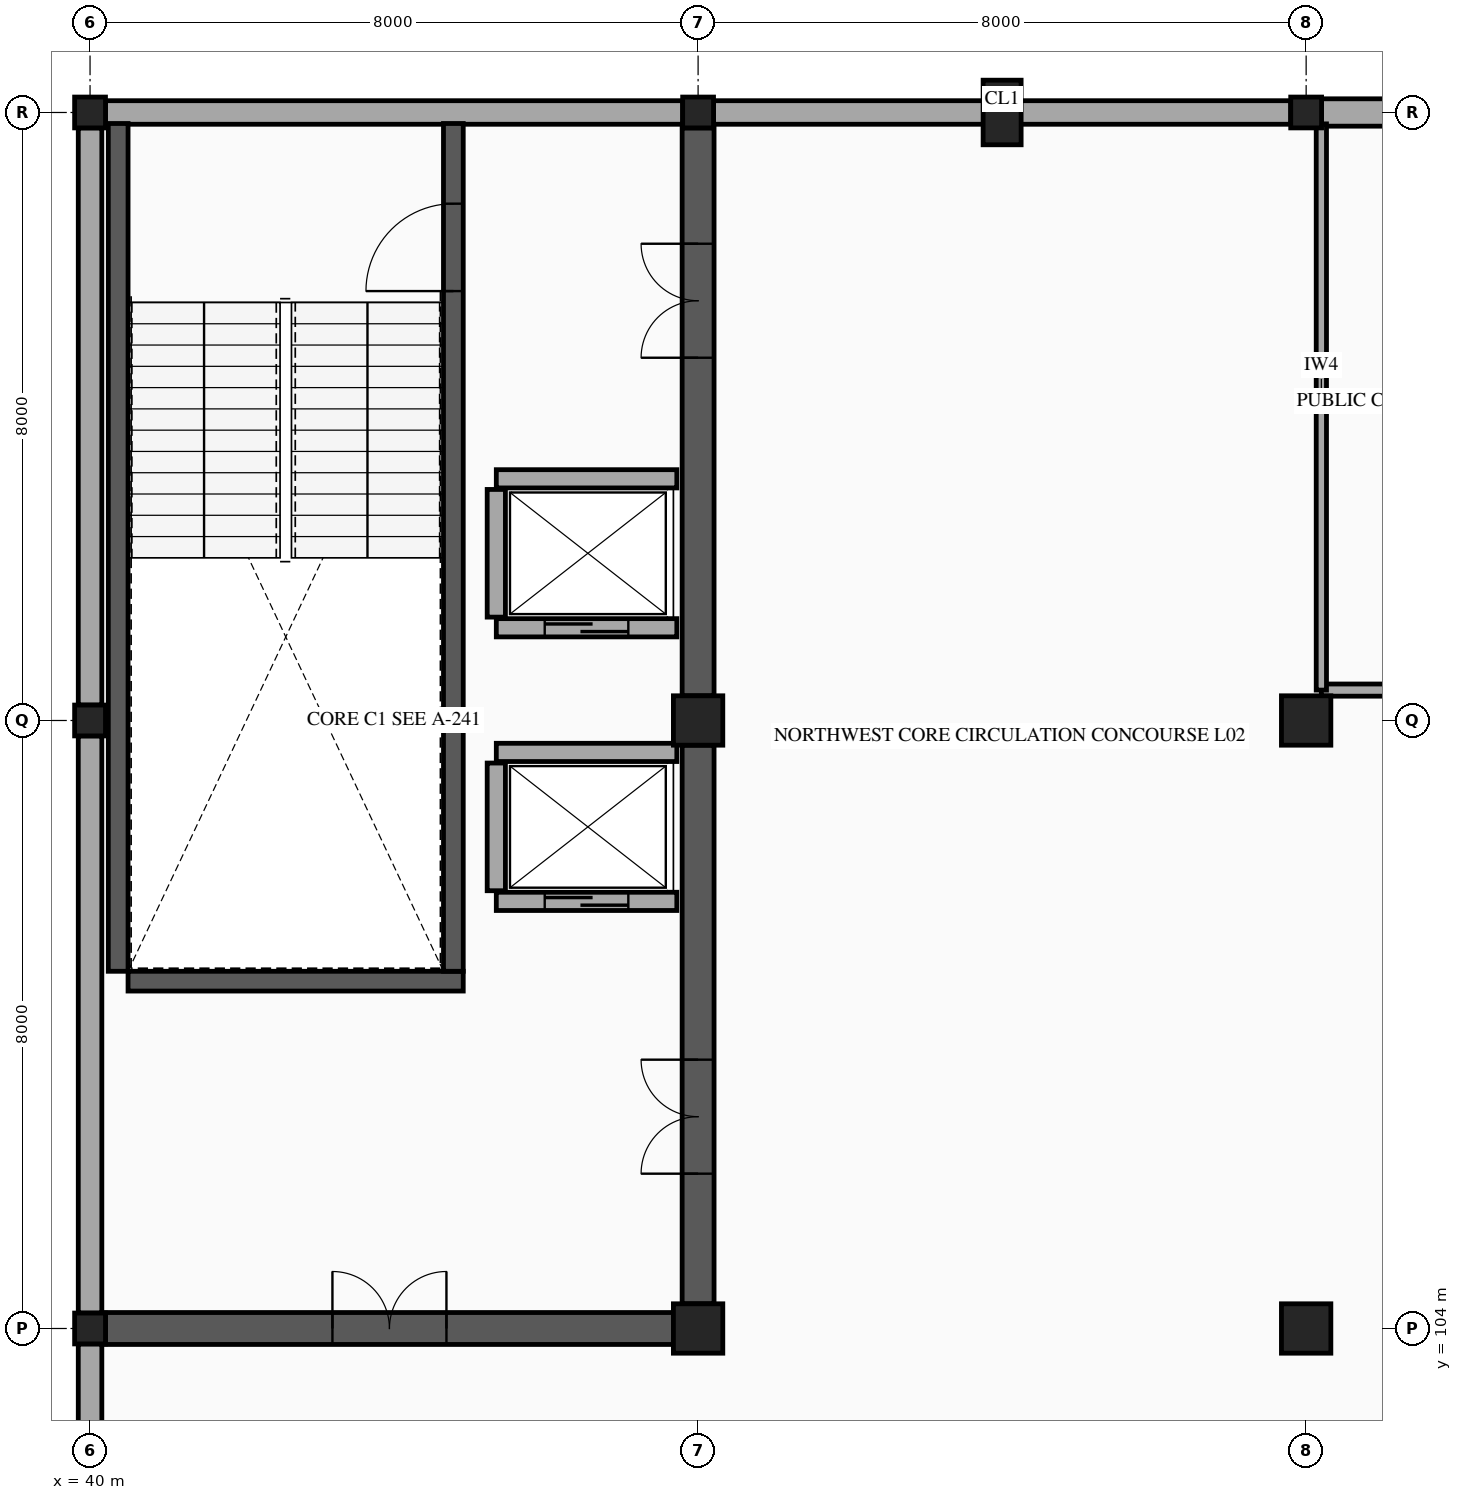
"""IFC4 building model, lengths in metres.
Left out: names, types, materials, properties, quantities, classifications, styles, units other than length and angle.
Written with IfcOpenShell. Run it as: python <this file> out.ifc"""

import sys

from ifc_helpers import new_model, si_unit, direction, frame, frame_2d, origin, origin_2d, place, context, subcontext, project, spatial, rectangle, hollow_rectangle, extrude, element, fill, save


model = new_model("IFC4")
c1 = context("Model", 3, precision=1e-05, world=origin(), true_north=direction((0.0, 1.0)))
c2 = subcontext(c1, "Body", "Model", "MODEL_VIEW")
j1 = project(units=[si_unit("LENGTHUNIT", "METRE"), si_unit("PLANEANGLEUNIT", "RADIAN")], contexts=[c1])
p1 = place(None, origin())
s1 = spatial("IfcSite", under=j1, at=p1, CompositionType="ELEMENT")
p2 = place(p1, origin())
s2 = spatial("IfcBuilding", under=s1, at=p2, CompositionType="ELEMENT")
p3 = place(p2, frame((0.0, 0.0, 10.4)))
s3 = spatial("IfcBuildingStorey", under=s2, at=p3, CompositionType="ELEMENT", Elevation=10.4)
for number, where, z_axis, x_axis in (
    (1, (40.0, 104.0, 0.0), (0.0, 0.0, 1.0), (1.0, 0.0, 0.0)),
    (2, (40.0, 112.0, 0.0), (0.0, 0.0, 1.0), (1.0, 0.0, 0.0)),
    (3, (40.0, 120.0, 0.0), (0.0, 0.0, 1.0), (1.0, 0.0, 0.0)),
):
    element("IfcColumn", number, at=place(p3, frame(where, z_axis=z_axis, x_axis=x_axis)), inside=s3, PredefinedType="COLUMN", context=c2, shape_type="SweptSolid", body=[
        extrude(hollow_rectangle(XDim=0.406, YDim=0.406, WallThickness=0.015, InnerFilletRadius=0.015, OuterFilletRadius=0.029, at=origin_2d()), origin(), (0.0, 0.0, 1.0), 4.5),
    ])
for number, where, z_axis, x_axis in (
    (4, (48.0, 104.0, 0.0), (0.0, 0.0, 1.0), (1.0, 0.0, 0.0)),
    (5, (48.0, 112.0, 0.0), (0.0, 0.0, 1.0), (1.0, 0.0, 0.0)),
):
    element("IfcColumn", number, at=place(p3, frame(where, z_axis=z_axis, x_axis=x_axis)), inside=s3, PredefinedType="COLUMN", context=c2, shape_type="SweptSolid", body=[
        extrude(rectangle(XDim=0.65, YDim=0.65, at=origin_2d()), origin(), (0.0, 0.0, 1.0), 4.5),
    ])
p4 = place(p3, frame((48.0, 120.0, 0.0), z_axis=(0.0, 0.0, 1.0), x_axis=(1.0, 0.0, 0.0)))
e6 = element("IfcColumn", 6, at=p4, inside=s3, PredefinedType="COLUMN", context=c2, shape_type="SweptSolid", body=[
    extrude(hollow_rectangle(XDim=0.406, YDim=0.406, WallThickness=0.015, InnerFilletRadius=0.015, OuterFilletRadius=0.029, at=origin_2d()), origin(), (0.0, 0.0, 1.0), 4.5),
])
for number, where, z_axis, x_axis in (
    (7, (56.0, 104.0, 0.0), (0.0, 0.0, 1.0), (1.0, 0.0, 0.0)),
    (8, (56.0, 112.0, 0.0), (0.0, 0.0, 1.0), (1.0, 0.0, 0.0)),
):
    element("IfcColumn", number, at=place(p3, frame(where, z_axis=z_axis, x_axis=x_axis)), inside=s3, PredefinedType="COLUMN", context=c2, shape_type="SweptSolid", body=[
        extrude(rectangle(XDim=0.65, YDim=0.65, at=origin_2d()), origin(), (0.0, 0.0, 1.0), 4.5),
    ])
p5 = place(p3, frame((56.0, 120.0, 0.0), z_axis=(0.0, 0.0, 1.0), x_axis=(1.0, 0.0, 0.0)))
e9 = element("IfcColumn", 9, at=p5, inside=s3, PredefinedType="COLUMN", context=c2, shape_type="SweptSolid", body=[
    extrude(hollow_rectangle(XDim=0.406, YDim=0.406, WallThickness=0.015, InnerFilletRadius=0.015, OuterFilletRadius=0.029, at=origin_2d()), origin(), (0.0, 0.0, 1.0), 4.5),
])
p6 = place(p3, frame((52.0, 120.0, 0.0), z_axis=(0.0, 0.0, 1.0), x_axis=(1.0, 0.0, 0.0)))
e10 = element("IfcColumn", 10, at=p6, inside=s3, PredefinedType="PILASTER", context=c2, shape_type="SweptSolid", body=[
    extrude(rectangle(XDim=0.5, YDim=0.85, at=origin_2d()), origin(), (0.0, 0.0, 1.0), 4.5),
])
p7 = place(p3, frame((40.0, 96.203, 0.0), z_axis=(0.0, 0.0, 1.0), x_axis=(0.0, 1.0, 0.0)))
e11 = element("IfcWall", 11, at=p7, inside=s3, PredefinedType="STANDARD", context=c2, shape_type="SweptSolid", body=[
    extrude(rectangle(XDim=7.594, YDim=0.31, at=frame_2d((3.797, 0.0))), origin(), (0.0, 0.0, 1.0), 3.48),
])
p8 = place(p7, frame((2.622, 0.0, 0.8)))
e12 = element("IfcOpeningElement", 12, at=p8, cuts=e11, PredefinedType="OPENING", context=c2, shape_type="SweptSolid", body=[
    extrude(rectangle(XDim=2.35, YDim=2.15, at=frame_2d((1.175, 1.075))), frame((0.0, 0.165, 0.0), z_axis=(0.0, -1.0, 0.0), x_axis=(1.0, 0.0, 0.0)), (0.0, 0.0, 1.0), 0.33),
])
for number, where, z_axis, x_axis in (
    (13, (40.0, 104.203, 0.0), (0.0, 0.0, 1.0), (0.0, 1.0, 0.0)),
    (14, (40.0, 112.203, 0.0), (0.0, 0.0, 1.0), (0.0, 1.0, 0.0)),
    (15, (40.203, 120.0, 0.0), (0.0, 0.0, 1.0), (1.0, 0.0, 0.0)),
    (16, (48.203, 120.0, 0.0), (0.0, 0.0, 1.0), (1.0, 0.0, 0.0)),
):
    element("IfcWall", number, at=place(p3, frame(where, z_axis=z_axis, x_axis=x_axis)), inside=s3, PredefinedType="STANDARD", context=c2, shape_type="SweptSolid", body=[
        extrude(rectangle(XDim=7.594, YDim=0.31, at=frame_2d((3.797, 0.0))), origin(), (0.0, 0.0, 1.0), 3.48),
    ])
p9 = place(p3, frame((56.203, 120.0, 0.0), z_axis=(0.0, 0.0, 1.0), x_axis=(1.0, 0.0, 0.0)))
e17 = element("IfcWall", 17, at=p9, inside=s3, PredefinedType="SOLIDWALL", context=c2, shape_type="SweptSolid", body=[
    extrude(rectangle(XDim=7.594, YDim=0.36, at=frame_2d((3.797, 0.0))), origin(), (0.0, 0.0, 1.0), 3.48),
])
p10 = place(p3, frame((40.5, 108.57, 0.0), z_axis=(0.0, 0.0, 1.0), x_axis=(1.0, 0.0, 0.0)))
e18 = element("IfcWall", 18, at=p10, inside=s3, PredefinedType="SHEAR", context=c2, shape_type="SweptSolid", body=[
    extrude(rectangle(XDim=4.41, YDim=0.26, at=frame_2d((2.205, 0.0))), origin(), (0.0, 0.0, 1.0), 4.28),
])
p11 = place(p3, frame((40.37, 108.7, 0.0), z_axis=(0.0, 0.0, 1.0), x_axis=(0.0, 1.0, 0.0)))
e19 = element("IfcWall", 19, at=p11, inside=s3, PredefinedType="SHEAR", context=c2, shape_type="SweptSolid", body=[
    extrude(rectangle(XDim=11.155, YDim=0.26, at=frame_2d((5.578, 0.0))), origin(), (0.0, 0.0, 1.0), 4.28),
])
p12 = place(p3, frame((44.78, 108.7, 0.0), z_axis=(0.0, 0.0, 1.0), x_axis=(0.0, 1.0, 0.0)))
e20 = element("IfcWall", 20, at=p12, inside=s3, PredefinedType="SHEAR", context=c2, shape_type="SweptSolid", body=[
    extrude(rectangle(XDim=11.155, YDim=0.26, at=frame_2d((5.578, 0.0))), origin(), (0.0, 0.0, 1.0), 4.28),
])
p13 = place(p12, frame((8.95, 0.0, 0.0)))
e21 = element("IfcOpeningElement", 21, at=p13, cuts=e20, PredefinedType="OPENING", context=c2, shape_type="SweptSolid", body=[
    extrude(rectangle(XDim=1.15, YDim=2.15, at=frame_2d((0.575, 1.075))), frame((0.0, 0.14, 0.0), z_axis=(0.0, -1.0, 0.0), x_axis=(1.0, 0.0, 0.0)), (0.0, 0.0, 1.0), 0.28),
])
p14 = place(p3, frame((40.203, 104.0, 0.0), z_axis=(0.0, 0.0, 1.0), x_axis=(1.0, 0.0, 0.0)))
e22 = element("IfcWall", 22, at=p14, inside=s3, PredefinedType="SHEAR", context=c2, shape_type="SweptSolid", body=[
    extrude(rectangle(XDim=7.472, YDim=0.42, at=frame_2d((3.736, 0.0))), origin(), (0.0, 0.0, 1.0), 4.28),
])
p15 = place(p14, frame((2.986, 0.0, 0.0)))
e23 = element("IfcOpeningElement", 23, at=p15, cuts=e22, PredefinedType="OPENING", context=c2, shape_type="SweptSolid", body=[
    extrude(rectangle(XDim=1.5, YDim=2.15, at=frame_2d((0.75, 1.075))), frame((0.0, 0.22, 0.0), z_axis=(0.0, -1.0, 0.0), x_axis=(1.0, 0.0, 0.0)), (0.0, 0.0, 1.0), 0.44),
])
p16 = place(p3, frame((48.0, 104.325, 0.0), z_axis=(0.0, 0.0, 1.0), x_axis=(0.0, 1.0, 0.0)))
e24 = element("IfcWall", 24, at=p16, inside=s3, PredefinedType="SHEAR", context=c2, shape_type="SweptSolid", body=[
    extrude(rectangle(XDim=7.35, YDim=0.42, at=frame_2d((3.675, 0.0))), origin(), (0.0, 0.0, 1.0), 4.28),
])
p17 = place(p16, frame((1.712, 0.0, 0.0)))
e25 = element("IfcOpeningElement", 25, at=p17, cuts=e24, PredefinedType="OPENING", context=c2, shape_type="SweptSolid", body=[
    extrude(rectangle(XDim=1.5, YDim=2.15, at=frame_2d((0.75, 1.075))), frame((0.0, 0.22, 0.0), z_axis=(0.0, -1.0, 0.0), x_axis=(1.0, 0.0, 0.0)), (0.0, 0.0, 1.0), 0.44),
])
p18 = place(p3, frame((48.0, 112.325, 0.0), z_axis=(0.0, 0.0, 1.0), x_axis=(0.0, 1.0, 0.0)))
e26 = element("IfcWall", 26, at=p18, inside=s3, PredefinedType="SHEAR", context=c2, shape_type="SweptSolid", body=[
    extrude(rectangle(XDim=7.472, YDim=0.42, at=frame_2d((3.736, 0.0))), origin(), (0.0, 0.0, 1.0), 4.28),
])
p19 = place(p18, frame((4.448, 0.0, 0.0)))
e27 = element("IfcOpeningElement", 27, at=p19, cuts=e26, PredefinedType="OPENING", context=c2, shape_type="SweptSolid", body=[
    extrude(rectangle(XDim=1.5, YDim=2.15, at=frame_2d((0.75, 1.075))), frame((0.0, 0.22, 0.0), z_axis=(0.0, -1.0, 0.0), x_axis=(1.0, 0.0, 0.0)), (0.0, 0.0, 1.0), 0.44),
])
p20 = place(p3, frame((45.345, 113.22, 0.0), z_axis=(0.0, 0.0, 1.0), x_axis=(1.0, 0.0, 0.0)))
e28 = element("IfcWall", 28, at=p20, inside=s3, PredefinedType="PARTITIONING", context=c2, shape_type="SweptSolid", body=[
    extrude(rectangle(XDim=2.375, YDim=0.24, at=frame_2d((1.188, 0.0))), origin(), (0.0, 0.0, 1.0), 4.28),
])
p21 = place(p20, frame((0.637, 0.0, 0.0)))
e29 = element("IfcOpeningElement", 29, at=p21, cuts=e28, PredefinedType="OPENING", context=c2, shape_type="SweptSolid", body=[
    extrude(rectangle(XDim=1.1, YDim=2.15, at=frame_2d((0.55, 1.075))), frame((0.0, 0.13, 0.0), z_axis=(0.0, -1.0, 0.0), x_axis=(1.0, 0.0, 0.0)), (0.0, 0.0, 1.0), 0.26),
])
p22 = place(p3, frame((45.345, 115.18, 0.0), z_axis=(0.0, 0.0, 1.0), x_axis=(1.0, 0.0, 0.0)))
e30 = element("IfcWall", 30, at=p22, inside=s3, PredefinedType="PARTITIONING", context=c2, shape_type="SweptSolid", body=[
    extrude(rectangle(XDim=2.375, YDim=0.24, at=frame_2d((1.188, 0.0))), origin(), (0.0, 0.0, 1.0), 4.28),
])
p23 = place(p3, frame((45.345, 113.36, 0.0), z_axis=(0.0, 0.0, 1.0), x_axis=(0.0, 1.0, 0.0)))
e31 = element("IfcWall", 31, at=p23, inside=s3, PredefinedType="PARTITIONING", context=c2, shape_type="SweptSolid", body=[
    extrude(rectangle(XDim=1.68, YDim=0.24, at=frame_2d((0.84, 0.0))), origin(), (0.0, 0.0, 1.0), 4.28),
])
p24 = place(p3, frame((45.345, 109.62, 0.0), z_axis=(0.0, 0.0, 1.0), x_axis=(1.0, 0.0, 0.0)))
e32 = element("IfcWall", 32, at=p24, inside=s3, PredefinedType="PARTITIONING", context=c2, shape_type="SweptSolid", body=[
    extrude(rectangle(XDim=2.375, YDim=0.24, at=frame_2d((1.188, 0.0))), origin(), (0.0, 0.0, 1.0), 4.28),
])
p25 = place(p24, frame((0.637, 0.0, 0.0)))
e33 = element("IfcOpeningElement", 33, at=p25, cuts=e32, PredefinedType="OPENING", context=c2, shape_type="SweptSolid", body=[
    extrude(rectangle(XDim=1.1, YDim=2.15, at=frame_2d((0.55, 1.075))), frame((0.0, 0.13, 0.0), z_axis=(0.0, -1.0, 0.0), x_axis=(1.0, 0.0, 0.0)), (0.0, 0.0, 1.0), 0.26),
])
p26 = place(p3, frame((45.345, 111.58, 0.0), z_axis=(0.0, 0.0, 1.0), x_axis=(1.0, 0.0, 0.0)))
e34 = element("IfcWall", 34, at=p26, inside=s3, PredefinedType="PARTITIONING", context=c2, shape_type="SweptSolid", body=[
    extrude(rectangle(XDim=2.375, YDim=0.24, at=frame_2d((1.188, 0.0))), origin(), (0.0, 0.0, 1.0), 4.28),
])
p27 = place(p3, frame((45.345, 109.76, 0.0), z_axis=(0.0, 0.0, 1.0), x_axis=(0.0, 1.0, 0.0)))
e35 = element("IfcWall", 35, at=p27, inside=s3, PredefinedType="PARTITIONING", context=c2, shape_type="SweptSolid", body=[
    extrude(rectangle(XDim=1.68, YDim=0.24, at=frame_2d((0.84, 0.0))), origin(), (0.0, 0.0, 1.0), 4.28),
])
p28 = place(p3, frame((56.2, 112.4, 0.0), z_axis=(0.0, 0.0, 1.0), x_axis=(1.0, 0.0, 0.0)))
e36 = element("IfcWall", 36, at=p28, inside=s3, PredefinedType="PARTITIONING", context=c2, shape_type="SweptSolid", body=[
    extrude(rectangle(XDim=4.7, YDim=0.16, at=frame_2d((2.35, 0.0))), origin(), (0.0, 0.0, 1.0), 3.48),
])
p29 = place(p28, frame((3.193, 0.0, 0.0)))
e37 = element("IfcOpeningElement", 37, at=p29, cuts=e36, PredefinedType="OPENING", context=c2, shape_type="SweptSolid", body=[
    extrude(rectangle(XDim=0.92, YDim=2.1, at=frame_2d((0.46, 1.05))), frame((0.0, 0.09, 0.0), z_axis=(0.0, -1.0, 0.0), x_axis=(1.0, 0.0, 0.0)), (0.0, 0.0, 1.0), 0.18),
])
p30 = place(p3, frame((56.2, 112.4, 0.0), z_axis=(0.0, 0.0, 1.0), x_axis=(0.0, 1.0, 0.0)))
e38 = element("IfcWall", 38, at=p30, inside=s3, PredefinedType="PARTITIONING", context=c2, shape_type="SweptSolid", body=[
    extrude(rectangle(XDim=7.45, YDim=0.135, at=frame_2d((3.725, 0.0))), origin(), (0.0, 0.0, 1.0), 3.48),
])
p31 = place(p13, origin())
e39 = element("IfcDoor", 39, at=p31, inside=s3, OperationType="SINGLE_SWING_LEFT", PredefinedType="DOOR", context=c2, shape_type="SweptSolid", body=[
    extrude(rectangle(XDim=1.15, YDim=2.15, at=frame_2d((0.575, 1.075))), frame((0.0, 0.025, 0.0), z_axis=(0.0, -1.0, 0.0), x_axis=(1.0, 0.0, 0.0)), (0.0, 0.0, 1.0), 0.05),
])
fill(e21, e39)
p32 = place(p15, origin())
e40 = element("IfcDoor", 40, at=p32, inside=s3, OperationType="DOUBLE_DOOR_SINGLE_SWING", PredefinedType="DOOR", context=c2, shape_type="SweptSolid", body=[
    extrude(rectangle(XDim=1.5, YDim=2.15, at=frame_2d((0.75, 1.075))), frame((0.0, 0.025, 0.0), z_axis=(0.0, -1.0, 0.0), x_axis=(1.0, 0.0, 0.0)), (0.0, 0.0, 1.0), 0.05),
])
fill(e23, e40)
p33 = place(p17, origin())
e41 = element("IfcDoor", 41, at=p33, inside=s3, OperationType="DOUBLE_DOOR_SINGLE_SWING", PredefinedType="DOOR", context=c2, shape_type="SweptSolid", body=[
    extrude(rectangle(XDim=1.5, YDim=2.15, at=frame_2d((0.75, 1.075))), frame((0.0, 0.025, 0.0), z_axis=(0.0, -1.0, 0.0), x_axis=(1.0, 0.0, 0.0)), (0.0, 0.0, 1.0), 0.05),
])
fill(e25, e41)
p34 = place(p19, origin())
e42 = element("IfcDoor", 42, at=p34, inside=s3, OperationType="DOUBLE_DOOR_SINGLE_SWING", PredefinedType="DOOR", context=c2, shape_type="SweptSolid", body=[
    extrude(rectangle(XDim=1.5, YDim=2.15, at=frame_2d((0.75, 1.075))), frame((0.0, 0.025, 0.0), z_axis=(0.0, -1.0, 0.0), x_axis=(1.0, 0.0, 0.0)), (0.0, 0.0, 1.0), 0.05),
])
fill(e27, e42)
p35 = place(p21, origin())
e43 = element("IfcDoor", 43, at=p35, inside=s3, OperationType="SLIDING_TO_LEFT", PredefinedType="DOOR", context=c2, shape_type="SweptSolid", body=[
    extrude(rectangle(XDim=1.1, YDim=2.15, at=frame_2d((0.55, 1.075))), frame((0.0, 0.025, 0.0), z_axis=(0.0, -1.0, 0.0), x_axis=(1.0, 0.0, 0.0)), (0.0, 0.0, 1.0), 0.05),
])
fill(e29, e43)
p36 = place(p25, origin())
e44 = element("IfcDoor", 44, at=p36, inside=s3, OperationType="SLIDING_TO_LEFT", PredefinedType="DOOR", context=c2, shape_type="SweptSolid", body=[
    extrude(rectangle(XDim=1.1, YDim=2.15, at=frame_2d((0.55, 1.075))), frame((0.0, 0.025, 0.0), z_axis=(0.0, -1.0, 0.0), x_axis=(1.0, 0.0, 0.0)), (0.0, 0.0, 1.0), 0.05),
])
fill(e33, e44)
save(model, sys.argv[1])
